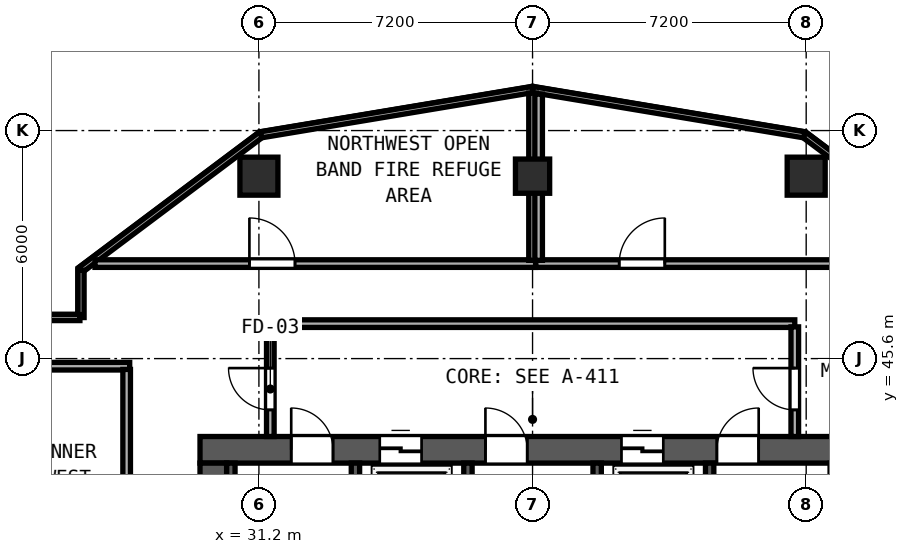
"""IFC4 building model, lengths in metres.
Left out: names, types, materials, properties, quantities, classifications, styles, units other than length and angle.
Written with IfcOpenShell. Run it as: python <this file> out.ifc"""

import sys

from ifc_helpers import new_model, si_unit, direction, frame, frame_2d, origin, origin_2d, place, context, subcontext, project, spatial, rectangle, hollow_rectangle, extrude, element, fill, save


model = new_model("IFC4")
c1 = context("Model", 3, precision=1e-05, world=origin(), true_north=direction((0.0, 1.0)))
c2 = subcontext(c1, "Body", "Model", "MODEL_VIEW")
j1 = project(units=[si_unit("LENGTHUNIT", "METRE"), si_unit("PLANEANGLEUNIT", "RADIAN")], contexts=[c1])
p1 = place(None, origin())
s1 = spatial("IfcSite", under=j1, at=p1, CompositionType="ELEMENT")
p2 = place(p1, origin())
s2 = spatial("IfcBuilding", under=s1, at=p2, CompositionType="ELEMENT")
p3 = place(p2, frame((0.0, 0.0, 136.4)))
s3 = spatial("IfcBuildingStorey", under=s2, at=p3, CompositionType="ELEMENT", Elevation=136.4)
p4 = place(p3, frame((29.65, 43.2, 0.0), z_axis=(0.0, 0.0, 1.0), x_axis=(1.0, 0.0, 0.0)))
e1 = element("IfcWall", 1, at=p4, inside=s3, PredefinedType="SHEAR", context=c2, shape_type="SweptSolid", body=[
    extrude(rectangle(XDim=17.5, YDim=0.7, at=frame_2d((8.75, 0.0))), origin(), (0.0, 0.0, 1.0), 4.4),
])
p5 = place(p4, frame((2.4, 0.0, 0.0)))
e2 = element("IfcOpeningElement", 2, at=p5, cuts=e1, PredefinedType="OPENING", context=c2, shape_type="SweptSolid", body=[
    extrude(rectangle(XDim=1.1, YDim=2.15, at=frame_2d((0.55, 1.075))), frame((0.0, 0.36, 0.0), z_axis=(0.0, -1.0, 0.0), x_axis=(1.0, 0.0, 0.0)), (0.0, 0.0, 1.0), 0.72),
])
p6 = place(p4, frame((7.51, 0.0, 0.0)))
e3 = element("IfcOpeningElement", 3, at=p6, cuts=e1, PredefinedType="OPENING", context=c2, shape_type="SweptSolid", body=[
    extrude(rectangle(XDim=1.1, YDim=2.15, at=frame_2d((0.55, 1.075))), frame((0.0, 0.36, 0.0), z_axis=(0.0, -1.0, 0.0), x_axis=(1.0, 0.0, 0.0)), (0.0, 0.0, 1.0), 0.72),
])
p7 = place(p4, frame((13.6, 0.0, 0.0)))
e4 = element("IfcOpeningElement", 4, at=p7, cuts=e1, PredefinedType="OPENING", context=c2, shape_type="SweptSolid", body=[
    extrude(rectangle(XDim=1.1, YDim=2.15, at=frame_2d((0.55, 1.075))), frame((0.0, 0.36, 0.0), z_axis=(0.0, -1.0, 0.0), x_axis=(1.0, 0.0, 0.0)), (0.0, 0.0, 1.0), 0.72),
])
p8 = place(p4, frame((4.73, 0.0, 0.0)))
e5 = element("IfcOpeningElement", 5, at=p8, cuts=e1, PredefinedType="OPENING", context=c2, shape_type="SweptSolid", body=[
    extrude(rectangle(XDim=1.1, YDim=2.2, at=frame_2d((0.55, 1.1))), frame((0.0, 0.36, 0.0), z_axis=(0.0, -1.0, 0.0), x_axis=(1.0, 0.0, 0.0)), (0.0, 0.0, 1.0), 0.72),
])
p9 = place(p4, frame((11.09, 0.0, 0.0)))
e6 = element("IfcOpeningElement", 6, at=p9, cuts=e1, PredefinedType="OPENING", context=c2, shape_type="SweptSolid", body=[
    extrude(rectangle(XDim=1.1, YDim=2.2, at=frame_2d((0.55, 1.1))), frame((0.0, 0.36, 0.0), z_axis=(0.0, -1.0, 0.0), x_axis=(1.0, 0.0, 0.0)), (0.0, 0.0, 1.0), 0.72),
])
p10 = place(p3, frame((30.0, 32.8, 0.0), z_axis=(0.0, 0.0, 1.0), x_axis=(0.0, 1.0, 0.0)))
e7 = element("IfcWall", 7, at=p10, inside=s3, PredefinedType="SHEAR", context=c2, shape_type="SweptSolid", body=[
    extrude(rectangle(XDim=10.05, YDim=0.7, at=frame_2d((5.025, 0.0))), origin(), (0.0, 0.0, 1.0), 4.4),
])
for number, where, z_axis, x_axis in (
    (8, (30.462, 35.39, 0.0), (0.0, 0.0, 1.0), (0.0, 1.0, 0.0)),
    (9, (33.74, 35.39, 0.0), (0.0, 0.0, 1.0), (0.0, 1.0, 0.0)),
    (10, (36.7, 35.39, 0.0), (0.0, 0.0, 1.0), (0.0, 1.0, 0.0)),
    (11, (40.1, 35.39, 0.0), (0.0, 0.0, 1.0), (0.0, 1.0, 0.0)),
    (12, (43.06, 35.39, 0.0), (0.0, 0.0, 1.0), (0.0, 1.0, 0.0)),
):
    element("IfcWall", number, at=place(p3, frame(where, z_axis=z_axis, x_axis=x_axis)), inside=s3, PredefinedType="SHEAR", context=c2, shape_type="SweptSolid", body=[
        extrude(rectangle(XDim=7.46, YDim=0.22, at=frame_2d((3.73, 0.0))), origin(), (0.0, 0.0, 1.0), 4.4),
    ])
for number, where, z_axis, x_axis in (
    (13, (31.2, 50.4, 0.0), (0.0, 0.0, 1.0), (1.0, 0.0, 0.0)),
    (14, (45.6, 50.4, 0.0), (0.0, 0.0, 1.0), (1.0, 0.0, 0.0)),
):
    element("IfcColumn", number, at=place(p3, frame(where, z_axis=z_axis, x_axis=x_axis)), inside=s3, PredefinedType="COLUMN", context=c2, shape_type="SweptSolid", body=[
        extrude(hollow_rectangle(XDim=1.0, YDim=1.0, WallThickness=0.038, at=origin_2d()), origin(), (0.0, 0.0, 1.0), 4.6),
    ])
p11 = place(p3, frame((38.4, 50.4, 0.0), z_axis=(0.0, 0.0, 1.0), x_axis=(1.0, 0.0, 0.0)))
e15 = element("IfcColumn", 15, at=p11, inside=s3, PredefinedType="COLUMN", context=c2, shape_type="SweptSolid", body=[
    extrude(hollow_rectangle(XDim=0.9, YDim=0.9, WallThickness=0.034, at=origin_2d()), origin(), (0.0, 0.0, 1.0), 4.6),
])
p12 = place(p3, frame((50.268, 47.949, 0.0), z_axis=(0.0, 0.0, 1.0), x_axis=(-0.800004969205, 0.599993374337, 0.0)))
e16 = element("IfcWall", 16, at=p12, inside=s3, PredefinedType="PARAPET", context=c2, shape_type="SweptSolid", body=[
    extrude(rectangle(XDim=5.896, YDim=0.16, at=frame_2d((2.948, 0.0))), origin(), (0.0, 0.0, 1.0), 1.15),
])
p13 = place(p3, frame((45.552, 51.486, 0.0), z_axis=(0.0, 0.0, 1.0), x_axis=(-0.986394833909, 0.164393526752, 0.0)))
e17 = element("IfcWall", 17, at=p13, inside=s3, PredefinedType="PARAPET", context=c2, shape_type="SweptSolid", body=[
    extrude(rectangle(XDim=7.25, YDim=0.16, at=frame_2d((3.625, 0.0))), origin(), (0.0, 0.0, 1.0), 1.15),
])
p14 = place(p3, frame((38.4, 52.678, 0.0), z_axis=(0.0, 0.0, 1.0), x_axis=(-0.986393923832, -0.164398987305, 0.0)))
e18 = element("IfcWall", 18, at=p14, inside=s3, PredefinedType="PARAPET", context=c2, shape_type="SweptSolid", body=[
    extrude(rectangle(XDim=7.25, YDim=0.16, at=frame_2d((3.625, 0.0))), origin(), (0.0, 0.0, 1.0), 1.15),
])
p15 = place(p3, frame((31.249, 51.486, 0.0), z_axis=(0.0, 0.0, 1.0), x_axis=(-0.8, -0.6, 0.0)))
e19 = element("IfcWall", 19, at=p15, inside=s3, PredefinedType="PARAPET", context=c2, shape_type="SweptSolid", body=[
    extrude(rectangle(XDim=5.911, YDim=0.16, at=frame_2d((2.955, 0.0))), origin(), (0.0, 0.0, 1.0), 1.15),
])
p16 = place(p3, frame((26.52, 47.925, 0.0), z_axis=(0.0, 0.0, 1.0), x_axis=(0.0, -1.0, 0.0)))
e20 = element("IfcWall", 20, at=p16, inside=s3, PredefinedType="PARAPET", context=c2, shape_type="SweptSolid", body=[
    extrude(rectangle(XDim=1.245, YDim=0.16, at=frame_2d((0.623, 0.0))), origin(), (0.0, 0.0, 1.0), 1.15),
])
p17 = place(p3, frame((26.49, 46.68, 0.0), z_axis=(0.0, 0.0, 1.0), x_axis=(-1.0, 0.0, 0.0)))
e21 = element("IfcWall", 21, at=p17, inside=s3, PredefinedType="PARAPET", context=c2, shape_type="SweptSolid", body=[
    extrude(rectangle(XDim=1.17, YDim=0.16, at=frame_2d((0.585, 0.0))), origin(), (0.0, 0.0, 1.0), 1.15),
])
p18 = place(p3, frame((31.5, 46.52, 0.0), z_axis=(0.0, 0.0, 1.0), x_axis=(1.0, 0.0, 0.0)))
e22 = element("IfcWall", 22, at=p18, inside=s3, PredefinedType="SOLIDWALL", context=c2, shape_type="SweptSolid", body=[
    extrude(rectangle(XDim=13.8, YDim=0.2, at=frame_2d((6.9, 0.0))), origin(), (0.0, 0.0, 1.0), 4.4),
])
p19 = place(p3, frame((31.5, 43.55, 0.0), z_axis=(0.0, 0.0, 1.0), x_axis=(0.0, 1.0, 0.0)))
e23 = element("IfcWall", 23, at=p19, inside=s3, PredefinedType="SOLIDWALL", context=c2, shape_type="SweptSolid", body=[
    extrude(rectangle(XDim=2.885, YDim=0.2, at=frame_2d((1.442, 0.0))), origin(), (0.0, 0.0, 1.0), 4.4),
])
p20 = place(p19, frame((1.8, 0.0, 0.0), z_axis=(0.0, 0.0, 1.0), x_axis=(-1.0, 0.0, 0.0)))
e24 = element("IfcOpeningElement", 24, at=p20, cuts=e23, PredefinedType="OPENING", context=c2, shape_type="SweptSolid", body=[
    extrude(rectangle(XDim=1.1, YDim=2.15, at=frame_2d((0.55, 1.075))), frame((0.0, 0.11, 0.0), z_axis=(0.0, -1.0, 0.0), x_axis=(1.0, 0.0, 0.0)), (0.0, 0.0, 1.0), 0.22),
])
p21 = place(p3, frame((45.3, 43.55, 0.0), z_axis=(0.0, 0.0, 1.0), x_axis=(0.0, 1.0, 0.0)))
e25 = element("IfcWall", 25, at=p21, inside=s3, PredefinedType="SOLIDWALL", context=c2, shape_type="SweptSolid", body=[
    extrude(rectangle(XDim=2.885, YDim=0.2, at=frame_2d((1.442, 0.0))), origin(), (0.0, 0.0, 1.0), 4.4),
])
p22 = place(p21, frame((0.7, 0.0, 0.0)))
e26 = element("IfcOpeningElement", 26, at=p22, cuts=e25, PredefinedType="OPENING", context=c2, shape_type="SweptSolid", body=[
    extrude(rectangle(XDim=1.1, YDim=2.15, at=frame_2d((0.55, 1.075))), frame((0.0, 0.11, 0.0), z_axis=(0.0, -1.0, 0.0), x_axis=(1.0, 0.0, 0.0)), (0.0, 0.0, 1.0), 0.22),
])
p23 = place(p3, frame((25.412, 45.4, 0.0), z_axis=(0.0, 0.0, 1.0), x_axis=(1.0, 0.0, 0.0)))
e27 = element("IfcWall", 27, at=p23, inside=s3, PredefinedType="SOLIDWALL", context=c2, shape_type="SweptSolid", body=[
    extrude(rectangle(XDim=2.388, YDim=0.2, at=frame_2d((1.194, 0.0))), origin(), (0.0, 0.0, 1.0), 4.4),
])
p24 = place(p3, frame((27.72, 38.845, 0.0), z_axis=(0.0, 0.0, 1.0), x_axis=(0.0, 1.0, 0.0)))
e28 = element("IfcWall", 28, at=p24, inside=s3, PredefinedType="SOLIDWALL", context=c2, shape_type="SweptSolid", body=[
    extrude(rectangle(XDim=6.47, YDim=0.2, at=frame_2d((3.235, 0.0))), origin(), (0.0, 0.0, 1.0), 4.4),
])
p25 = place(p24, frame((3.135, 0.0, 0.0), z_axis=(0.0, 0.0, 1.0), x_axis=(-1.0, 0.0, 0.0)))
e29 = element("IfcOpeningElement", 29, at=p25, cuts=e28, PredefinedType="OPENING", context=c2, shape_type="SweptSolid", body=[
    extrude(rectangle(XDim=1.1, YDim=2.15, at=frame_2d((0.55, 1.075))), frame((0.0, 0.11, 0.0), z_axis=(0.0, -1.0, 0.0), x_axis=(1.0, 0.0, 0.0)), (0.0, 0.0, 1.0), 0.22),
])
p26 = place(p3, frame((26.887, 48.1, 0.0), z_axis=(0.0, 0.0, 1.0), x_axis=(1.0, 0.0, 0.0)))
e30 = element("IfcWall", 30, at=p26, inside=s3, PredefinedType="SOLIDWALL", context=c2, shape_type="SweptSolid", body=[
    extrude(rectangle(XDim=11.593, YDim=0.2, at=frame_2d((5.797, 0.0))), origin(), (0.0, 0.0, 1.0), 4.4),
])
p27 = place(p26, frame((4.063, 0.0, 0.0)))
e31 = element("IfcOpeningElement", 31, at=p27, cuts=e30, PredefinedType="OPENING", context=c2, shape_type="SweptSolid", body=[
    extrude(rectangle(XDim=1.2, YDim=2.15, at=frame_2d((0.6, 1.075))), frame((0.0, 0.11, 0.0), z_axis=(0.0, -1.0, 0.0), x_axis=(1.0, 0.0, 0.0)), (0.0, 0.0, 1.0), 0.22),
])
p28 = place(p3, frame((38.4, 48.185, 0.0), z_axis=(0.0, 0.0, 1.0), x_axis=(0.0, 1.0, 0.0)))
e32 = element("IfcWall", 32, at=p28, inside=s3, PredefinedType="SOLIDWALL", context=c2, shape_type="SweptSolid", body=[
    extrude(rectangle(XDim=4.4, YDim=0.2, at=frame_2d((2.2, 0.0))), origin(), (0.0, 0.0, 1.0), 4.4),
])
p29 = place(p3, frame((38.485, 48.1, 0.0), z_axis=(0.0, 0.0, 1.0), x_axis=(1.0, 0.0, 0.0)))
e33 = element("IfcWall", 33, at=p29, inside=s3, PredefinedType="SOLIDWALL", context=c2, shape_type="SweptSolid", body=[
    extrude(rectangle(XDim=11.428, YDim=0.2, at=frame_2d((5.714, 0.0))), origin(), (0.0, 0.0, 1.0), 4.4),
])
p30 = place(p29, frame((2.195, 0.0, 0.0)))
e34 = element("IfcOpeningElement", 34, at=p30, cuts=e33, PredefinedType="OPENING", context=c2, shape_type="SweptSolid", body=[
    extrude(rectangle(XDim=1.2, YDim=2.15, at=frame_2d((0.6, 1.075))), frame((0.0, 0.11, 0.0), z_axis=(0.0, -1.0, 0.0), x_axis=(1.0, 0.0, 0.0)), (0.0, 0.0, 1.0), 0.22),
])
p31 = place(p3, frame((38.56, 48.185, 0.0), z_axis=(0.0, 0.0, 1.0), x_axis=(0.0, 1.0, 0.0)))
e35 = element("IfcWall", 35, at=p31, inside=s3, PredefinedType="SOLIDWALL", context=c2, shape_type="SweptSolid", body=[
    extrude(rectangle(XDim=4.373, YDim=0.2, at=frame_2d((2.187, 0.0))), origin(), (0.0, 0.0, 1.0), 4.4),
])
p32 = place(p5, origin())
e36 = element("IfcDoor", 36, at=p32, inside=s3, OperationType="SINGLE_SWING_LEFT", PredefinedType="DOOR", context=c2, shape_type="SweptSolid", body=[
    extrude(rectangle(XDim=1.1, YDim=2.15, at=frame_2d((0.55, 1.075))), frame((0.0, 0.185, 0.0), z_axis=(0.0, -1.0, 0.0), x_axis=(1.0, 0.0, 0.0)), (0.0, 0.0, 1.0), 0.05),
])
fill(e2, e36)
p33 = place(p6, origin())
e37 = element("IfcDoor", 37, at=p33, inside=s3, OperationType="SINGLE_SWING_LEFT", PredefinedType="DOOR", context=c2, shape_type="SweptSolid", body=[
    extrude(rectangle(XDim=1.1, YDim=2.15, at=frame_2d((0.55, 1.075))), frame((0.0, 0.185, 0.0), z_axis=(0.0, -1.0, 0.0), x_axis=(1.0, 0.0, 0.0)), (0.0, 0.0, 1.0), 0.05),
])
fill(e3, e37)
p34 = place(p7, origin())
e38 = element("IfcDoor", 38, at=p34, inside=s3, OperationType="SINGLE_SWING_RIGHT", PredefinedType="DOOR", context=c2, shape_type="SweptSolid", body=[
    extrude(rectangle(XDim=1.1, YDim=2.15, at=frame_2d((0.55, 1.075))), frame((0.0, 0.185, 0.0), z_axis=(0.0, -1.0, 0.0), x_axis=(1.0, 0.0, 0.0)), (0.0, 0.0, 1.0), 0.05),
])
fill(e4, e38)
p35 = place(p20, origin())
e39 = element("IfcDoor", 39, at=p35, inside=s3, OperationType="SINGLE_SWING_LEFT", PredefinedType="DOOR", context=c2, shape_type="SweptSolid", body=[
    extrude(rectangle(XDim=1.1, YDim=2.15, at=frame_2d((0.55, 1.075))), frame((0.0, 0.025, 0.0), z_axis=(0.0, -1.0, 0.0), x_axis=(1.0, 0.0, 0.0)), (0.0, 0.0, 1.0), 0.05),
])
fill(e24, e39)
p36 = place(p22, origin())
e40 = element("IfcDoor", 40, at=p36, inside=s3, OperationType="SINGLE_SWING_RIGHT", PredefinedType="DOOR", context=c2, shape_type="SweptSolid", body=[
    extrude(rectangle(XDim=1.1, YDim=2.15, at=frame_2d((0.55, 1.075))), frame((0.0, 0.025, 0.0), z_axis=(0.0, -1.0, 0.0), x_axis=(1.0, 0.0, 0.0)), (0.0, 0.0, 1.0), 0.05),
])
fill(e26, e40)
p37 = place(p8, origin())
e41 = element("IfcDoor", 41, at=p37, inside=s3, OperationType="SLIDING_TO_LEFT", PredefinedType="DOOR", context=c2, shape_type="SweptSolid", body=[
    extrude(rectangle(XDim=1.1, YDim=2.2, at=frame_2d((0.55, 1.1))), frame((0.0, 0.185, 0.0), z_axis=(0.0, -1.0, 0.0), x_axis=(1.0, 0.0, 0.0)), (0.0, 0.0, 1.0), 0.05),
])
fill(e5, e41)
p38 = place(p9, origin())
e42 = element("IfcDoor", 42, at=p38, inside=s3, OperationType="SLIDING_TO_LEFT", PredefinedType="DOOR", context=c2, shape_type="SweptSolid", body=[
    extrude(rectangle(XDim=1.1, YDim=2.2, at=frame_2d((0.55, 1.1))), frame((0.0, 0.185, 0.0), z_axis=(0.0, -1.0, 0.0), x_axis=(1.0, 0.0, 0.0)), (0.0, 0.0, 1.0), 0.05),
])
fill(e6, e42)
p39 = place(p27, origin())
e43 = element("IfcDoor", 43, at=p39, inside=s3, OperationType="SINGLE_SWING_LEFT", PredefinedType="DOOR", context=c2, shape_type="SweptSolid", body=[
    extrude(rectangle(XDim=1.2, YDim=2.15, at=frame_2d((0.6, 1.075))), frame((0.0, 0.025, 0.0), z_axis=(0.0, -1.0, 0.0), x_axis=(1.0, 0.0, 0.0)), (0.0, 0.0, 1.0), 0.05),
])
fill(e31, e43)
p40 = place(p30, origin())
e44 = element("IfcDoor", 44, at=p40, inside=s3, OperationType="SINGLE_SWING_RIGHT", PredefinedType="DOOR", context=c2, shape_type="SweptSolid", body=[
    extrude(rectangle(XDim=1.2, YDim=2.15, at=frame_2d((0.6, 1.075))), frame((0.0, 0.025, 0.0), z_axis=(0.0, -1.0, 0.0), x_axis=(1.0, 0.0, 0.0)), (0.0, 0.0, 1.0), 0.05),
])
fill(e34, e44)
save(model, sys.argv[1])
